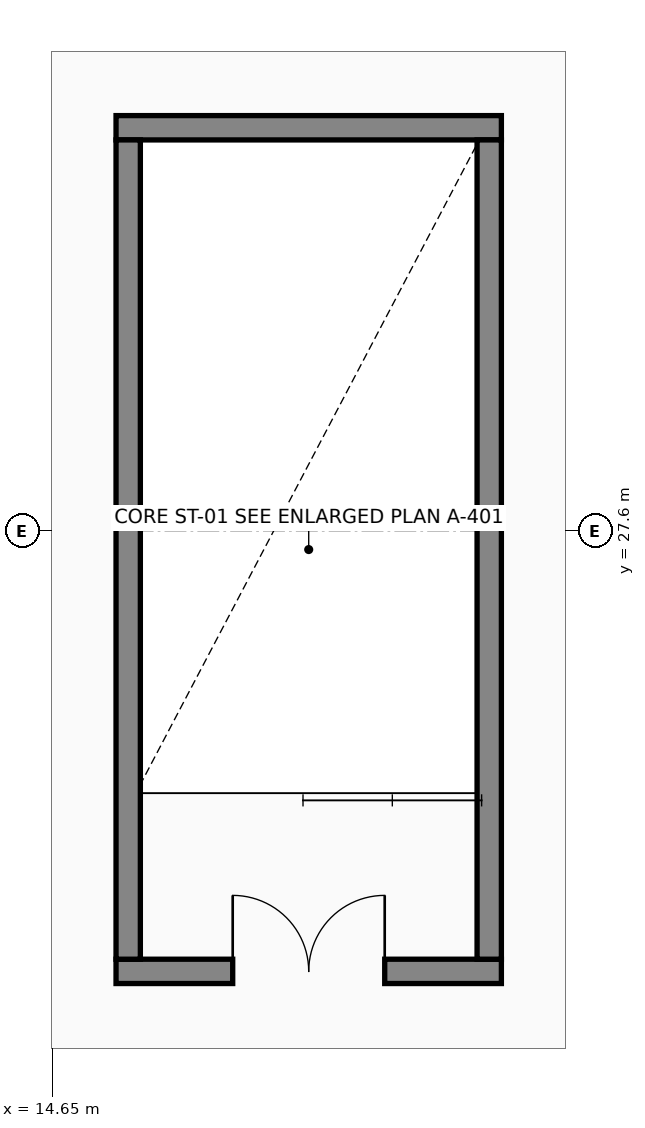
"""IFC4 building model, lengths in metres.
Left out: names, types, materials, properties, quantities, classifications, styles, units other than length and angle.
Written with IfcOpenShell. Run it as: python <this file> out.ifc"""

import sys

from ifc_helpers import new_model, si_unit, direction, frame, frame_2d, origin, place, context, subcontext, project, spatial, rectangle, extrude, element, fill, save


model = new_model("IFC4")
c1 = context("Model", 3, precision=1e-05, world=origin(), true_north=direction((0.0, 1.0)))
c2 = subcontext(c1, "Body", "Model", "MODEL_VIEW")
j1 = project(units=[si_unit("LENGTHUNIT", "METRE"), si_unit("PLANEANGLEUNIT", "RADIAN")], contexts=[c1])
p1 = place(None, origin())
s1 = spatial("IfcSite", under=j1, at=p1, CompositionType="ELEMENT")
p2 = place(p1, origin())
s2 = spatial("IfcBuilding", under=s1, at=p2, CompositionType="ELEMENT")
p3 = place(p2, frame((0.0, 0.0, 14.4)))
s3 = spatial("IfcBuildingStorey", under=s2, at=p3, CompositionType="ELEMENT", Elevation=14.4)
p4 = place(p3, frame((15.49, 21.8, 0.0), z_axis=(0.0, 0.0, 1.0), x_axis=(1.0, 0.0, 0.0)))
e1 = element("IfcWall", 1, at=p4, inside=s3, PredefinedType="SHEAR", context=c2, shape_type="SweptSolid", body=[
    extrude(rectangle(XDim=5.07, YDim=0.32, at=frame_2d((2.535, 0.0))), origin(), (0.0, 0.0, 1.0), 4.0),
])
p5 = place(p4, frame((1.535, 0.0, 0.0)))
e2 = element("IfcOpeningElement", 2, at=p5, cuts=e1, PredefinedType="OPENING", context=c2, shape_type="SweptSolid", body=[
    extrude(rectangle(XDim=2.0, YDim=2.15, at=frame_2d((1.0, 1.075))), frame((0.0, 0.17, 0.0), z_axis=(0.0, -1.0, 0.0), x_axis=(1.0, 0.0, 0.0)), (0.0, 0.0, 1.0), 0.34),
])
p6 = place(p3, frame((15.49, 32.9, 0.0), z_axis=(0.0, 0.0, 1.0), x_axis=(1.0, 0.0, 0.0)))
e3 = element("IfcWall", 3, at=p6, inside=s3, PredefinedType="SHEAR", context=c2, shape_type="SweptSolid", body=[
    extrude(rectangle(XDim=5.07, YDim=0.32, at=frame_2d((2.535, 0.0))), origin(), (0.0, 0.0, 1.0), 4.0),
])
for number, where, z_axis, x_axis in (
    (4, (15.65, 21.96, 0.0), (0.0, 0.0, 1.0), (0.0, 1.0, 0.0)),
    (5, (20.4, 21.96, 0.0), (0.0, 0.0, 1.0), (0.0, 1.0, 0.0)),
):
    element("IfcWall", number, at=place(p3, frame(where, z_axis=z_axis, x_axis=x_axis)), inside=s3, PredefinedType="SHEAR", context=c2, shape_type="SweptSolid", body=[
        extrude(rectangle(XDim=10.78, YDim=0.32, at=frame_2d((5.39, 0.0))), origin(), (0.0, 0.0, 1.0), 4.0),
    ])
p7 = place(p5, origin())
e6 = element("IfcDoor", 6, at=p7, inside=s3, OperationType="DOUBLE_DOOR_SINGLE_SWING", PredefinedType="DOOR", context=c2, shape_type="SweptSolid", body=[
    extrude(rectangle(XDim=2.0, YDim=2.15, at=frame_2d((1.0, 1.075))), frame((0.0, 0.025, 0.0), z_axis=(0.0, -1.0, 0.0), x_axis=(1.0, 0.0, 0.0)), (0.0, 0.0, 1.0), 0.05),
])
fill(e2, e6)
save(model, sys.argv[1])
